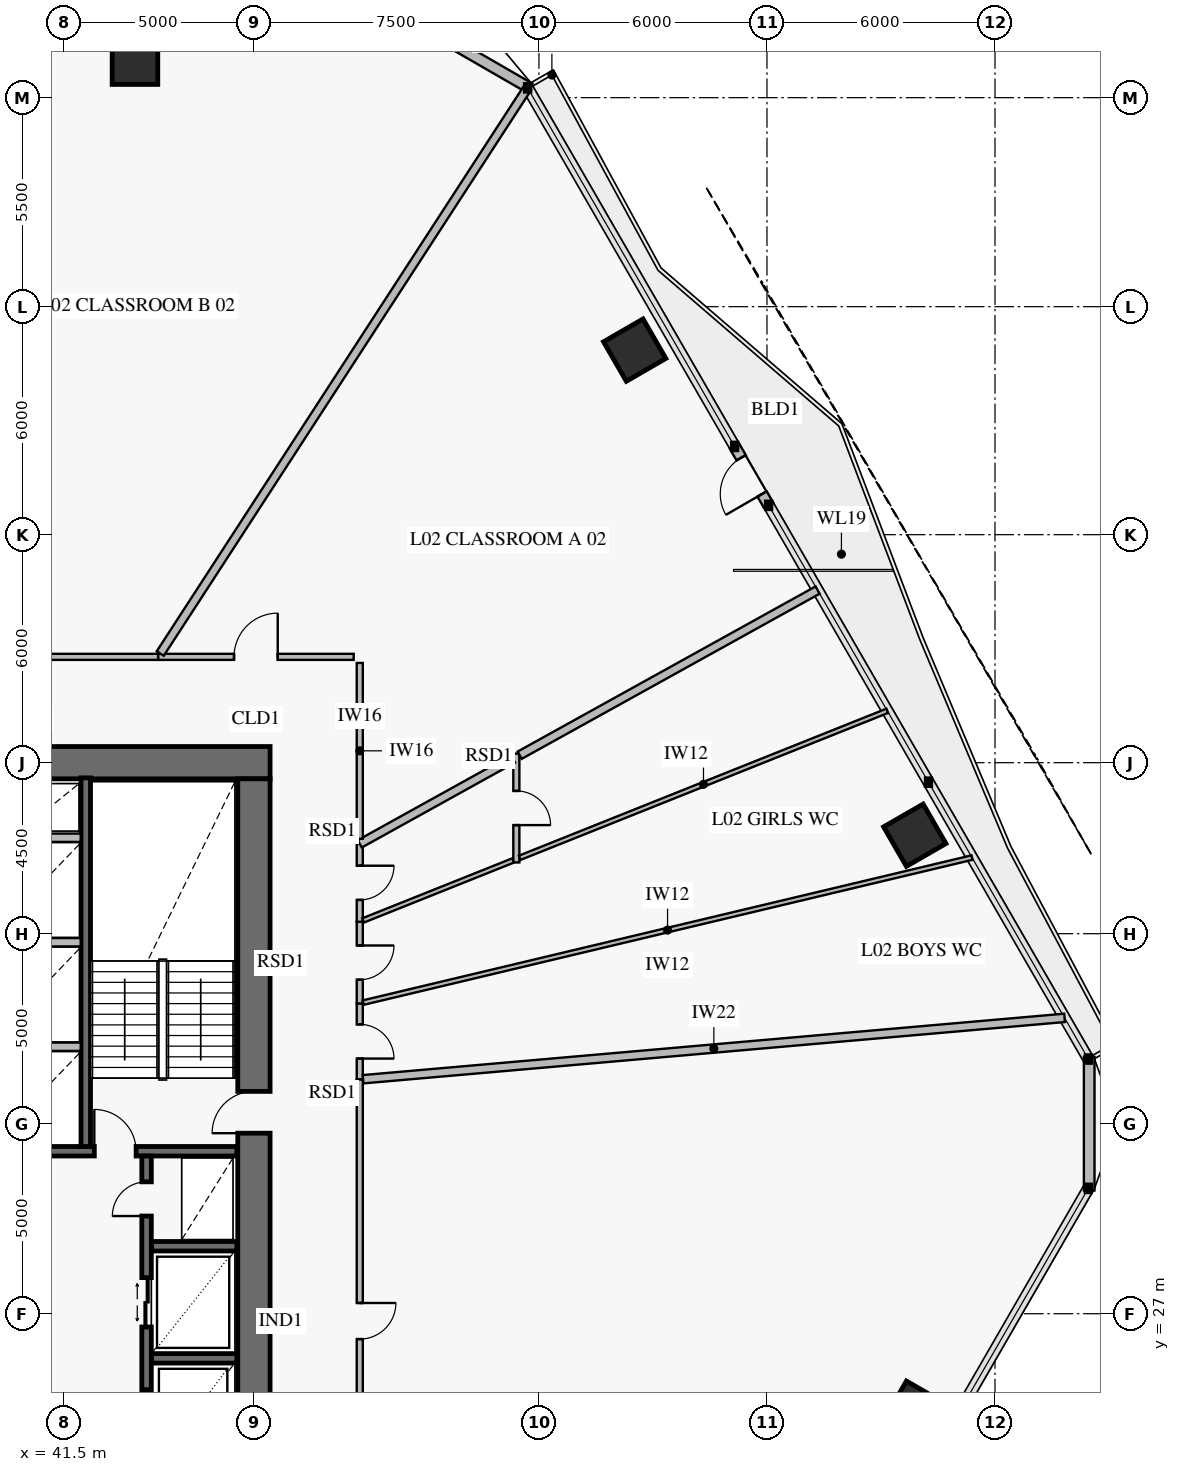
"""IFC4 building model, lengths in metres.
Left out: names, types, materials, properties, quantities, classifications, styles, units other than length and angle.
Written with IfcOpenShell. Run it as: python <this file> out.ifc"""

import sys

from ifc_helpers import new_model, si_unit, direction, frame, frame_2d, origin, origin_2d, place, context, subcontext, project, spatial, rectangle, extrude, element, fill, save


model = new_model("IFC4")
c1 = context("Model", 3, precision=1e-05, world=origin(), true_north=direction((0.0, 1.0)))
c2 = subcontext(c1, "Body", "Model", "MODEL_VIEW")
j1 = project(units=[si_unit("LENGTHUNIT", "METRE"), si_unit("PLANEANGLEUNIT", "RADIAN")], contexts=[c1])
p1 = place(None, origin())
s1 = spatial("IfcSite", under=j1, at=p1, CompositionType="ELEMENT")
p2 = place(p1, origin())
s2 = spatial("IfcBuilding", under=s1, at=p2, CompositionType="ELEMENT")
p3 = place(p2, frame((0.0, 0.0, 7.8)))
s3 = spatial("IfcBuildingStorey", under=s2, at=p3, CompositionType="ELEMENT", Elevation=7.8)
p4 = place(p3, frame((46.925, 41.5, 0.0), z_axis=(0.0, 0.0, 1.0), x_axis=(-1.0, 0.0, 0.0)))
e1 = element("IfcWall", 1, at=p4, inside=s3, PredefinedType="SHEAR", context=c2, shape_type="SweptSolid", body=[
    extrude(rectangle(XDim=7.975, YDim=0.85, at=frame_2d((3.988, 0.0))), origin(), (0.0, 0.0, 1.0), 4.2),
])
p5 = place(p3, frame((46.5, 22.925, 0.0), z_axis=(0.0, 0.0, 1.0), x_axis=(0.0, 1.0, 0.0)))
e2 = element("IfcWall", 2, at=p5, inside=s3, PredefinedType="SHEAR", context=c2, shape_type="SweptSolid", body=[
    extrude(rectangle(XDim=18.15, YDim=0.85, at=frame_2d((9.075, 0.0))), origin(), (0.0, 0.0, 1.0), 4.2),
])
p6 = place(p5, frame((8.825, 0.0, 0.0)))
e3 = element("IfcOpeningElement", 3, at=p6, cuts=e2, PredefinedType="OPENING", context=c2, shape_type="SweptSolid", body=[
    extrude(rectangle(XDim=1.1, YDim=2.15, at=frame_2d((0.55, 1.075))), frame((0.0, 0.437, 0.0), z_axis=(0.0, -1.0, 0.0), x_axis=(1.0, 0.0, 0.0)), (0.0, 0.0, 1.0), 0.874),
])
for number, where, z_axis, x_axis in (
    (4, (63.889, 39.592, 0.0), (0.0, 0.0, 1.0), (-0.5, 0.866, 0.0)),
    (5, (56.519, 52.357, 0.0), (0.0, 0.0, 1.0), (-0.5, 0.866, 0.0)),
    (6, (43.37, 59.948, 0.0), (0.0, 0.0, 1.0), (-1.0, 0.0, 0.0)),
    (7, (63.889, 24.408, 0.0), (0.0, 0.0, 1.0), (0.5, 0.866, 0.0)),
):
    element("IfcColumn", number, at=place(p3, frame(where, z_axis=z_axis, x_axis=x_axis)), inside=s3, PredefinedType="COLUMN", context=c2, shape_type="SweptSolid", body=[
        extrude(rectangle(XDim=1.2, YDim=1.2, at=origin_2d()), origin(), (0.0, 0.0, 1.0), 3.92),
    ])
p7 = place(p3, frame((50.717, 61.006, 0.0), z_axis=(0.0, 0.0, 1.0), x_axis=(0.866007452331, -0.500031091541, 0.0)))
e8 = element("IfcWall", 8, at=p7, inside=s3, PredefinedType="SOLIDWALL", context=c2, shape_type="SweptSolid", body=[
    extrude(rectangle(XDim=3.515, YDim=0.28, at=frame_2d((1.757, 0.0))), origin(), (0.0, 0.0, 1.0), 3.92),
])
p8 = place(p3, frame((59.148, 49.823, 0.0), z_axis=(0.0, 0.0, 1.0), x_axis=(0.499982180423, -0.866035691677, 0.0)))
e9 = element("IfcWall", 9, at=p8, inside=s3, PredefinedType="SOLIDWALL", context=c2, shape_type="SweptSolid", body=[
    extrude(rectangle(XDim=1.79, YDim=0.28, at=frame_2d((0.895, 0.0))), origin(), (0.0, 0.0, 1.0), 3.92),
])
p9 = place(p8, frame((0.345, 0.0, 0.0)))
e10 = element("IfcOpeningElement", 10, at=p9, cuts=e9, PredefinedType="OPENING", context=c2, shape_type="SweptSolid", body=[
    extrude(rectangle(XDim=1.1, YDim=2.2, at=frame_2d((0.55, 1.1))), frame((0.0, 0.152, 0.0), z_axis=(0.0, -1.0, 0.0), x_axis=(1.0, 0.0, 0.0)), (0.0, 0.0, 1.0), 0.304),
])
p10 = place(p3, frame((68.479, 33.758, 0.0), z_axis=(0.0, 0.0, 1.0), x_axis=(0.0, -1.0, 0.0)))
e11 = element("IfcWall", 11, at=p10, inside=s3, PredefinedType="SOLIDWALL", context=c2, shape_type="SweptSolid", body=[
    extrude(rectangle(XDim=3.515, YDim=0.28, at=frame_2d((1.758, 0.0))), origin(), (0.0, 0.0, 1.0), 3.92),
])
p11 = place(p3, frame((25.95, 31.275, 0.0), z_axis=(0.0, 0.0, 1.0), x_axis=(1.0, 0.0, 0.0)))
e12 = element("IfcWall", 12, at=p11, inside=s3, PredefinedType="SOLIDWALL", context=c2, shape_type="SweptSolid", body=[
    extrude(rectangle(XDim=20.1, YDim=0.25, at=frame_2d((10.05, 0.0))), origin(), (0.0, 0.0, 1.0), 4.2),
])
p12 = place(p11, frame((2.6, 0.0, 0.0)))
e13 = element("IfcOpeningElement", 13, at=p12, cuts=e12, PredefinedType="OPENING", context=c2, shape_type="SweptSolid", body=[
    extrude(rectangle(XDim=1.1, YDim=2.15, at=frame_2d((0.55, 1.075))), frame((0.0, 0.137, 0.0), z_axis=(0.0, -1.0, 0.0), x_axis=(1.0, 0.0, 0.0)), (0.0, 0.0, 1.0), 0.274),
])
p13 = place(p11, frame((10.6, 0.0, 0.0)))
e14 = element("IfcOpeningElement", 14, at=p13, cuts=e12, PredefinedType="OPENING", context=c2, shape_type="SweptSolid", body=[
    extrude(rectangle(XDim=1.1, YDim=2.15, at=frame_2d((0.55, 1.075))), frame((0.0, 0.137, 0.0), z_axis=(0.0, -1.0, 0.0), x_axis=(1.0, 0.0, 0.0)), (0.0, 0.0, 1.0), 0.274),
])
p14 = place(p11, frame((16.35, 0.0, 0.0)))
e15 = element("IfcOpeningElement", 15, at=p14, cuts=e12, PredefinedType="OPENING", context=c2, shape_type="SweptSolid", body=[
    extrude(rectangle(XDim=1.1, YDim=2.15, at=frame_2d((0.55, 1.075))), frame((0.0, 0.137, 0.0), z_axis=(0.0, -1.0, 0.0), x_axis=(1.0, 0.0, 0.0)), (0.0, 0.0, 1.0), 0.274),
])
p15 = place(p3, frame((42.075, 31.4, 0.0), z_axis=(0.0, 0.0, 1.0), x_axis=(0.0, 1.0, 0.0)))
e16 = element("IfcWall", 16, at=p15, inside=s3, PredefinedType="SOLIDWALL", context=c2, shape_type="SweptSolid", body=[
    extrude(rectangle(XDim=9.7, YDim=0.25, at=frame_2d((4.85, 0.0))), origin(), (0.0, 0.0, 1.0), 4.2),
])
for number, where, z_axis, x_axis in (
    (17, (43.8, 25.825, 0.0), (0.0, 0.0, 1.0), (1.0, 0.0, 0.0)),
    (18, (43.8, 28.775, 0.0), (0.0, 0.0, 1.0), (1.0, 0.0, 0.0)),
):
    element("IfcWall", number, at=place(p3, frame(where, z_axis=z_axis, x_axis=x_axis)), inside=s3, PredefinedType="SOLIDWALL", context=c2, shape_type="SweptSolid", body=[
        extrude(rectangle(XDim=2.25, YDim=0.25, at=frame_2d((1.125, 0.0))), origin(), (0.0, 0.0, 1.0), 4.2),
    ])
p16 = place(p3, frame((43.675, 22.95, 0.0), z_axis=(0.0, 0.0, 1.0), x_axis=(0.0, 1.0, 0.0)))
e19 = element("IfcWall", 19, at=p16, inside=s3, PredefinedType="SOLIDWALL", context=c2, shape_type="SweptSolid", body=[
    extrude(rectangle(XDim=8.2, YDim=0.25, at=frame_2d((4.1, 0.0))), origin(), (0.0, 0.0, 1.0), 4.2),
])
p17 = place(p16, frame((0.75, 0.0, 0.0)))
e20 = element("IfcOpeningElement", 20, at=p17, cuts=e19, PredefinedType="OPENING", context=c2, shape_type="SweptSolid", body=[
    extrude(rectangle(XDim=1.3, YDim=2.3, at=frame_2d((0.65, 1.15))), frame((0.0, 0.137, 0.0), z_axis=(0.0, -1.0, 0.0), x_axis=(1.0, 0.0, 0.0)), (0.0, 0.0, 1.0), 0.274),
])
p18 = place(p16, frame((3.7, 0.0, 0.0)))
e21 = element("IfcOpeningElement", 21, at=p18, cuts=e19, PredefinedType="OPENING", context=c2, shape_type="SweptSolid", body=[
    extrude(rectangle(XDim=1.3, YDim=2.3, at=frame_2d((0.65, 1.15))), frame((0.0, 0.137, 0.0), z_axis=(0.0, -1.0, 0.0), x_axis=(1.0, 0.0, 0.0)), (0.0, 0.0, 1.0), 0.274),
])
p19 = place(p16, frame((6.62, 0.0, 0.0)))
e22 = element("IfcOpeningElement", 22, at=p19, cuts=e19, PredefinedType="OPENING", context=c2, shape_type="SweptSolid", body=[
    extrude(rectangle(XDim=0.9, YDim=2.1, at=frame_2d((0.45, 1.05))), frame((0.0, 0.137, 0.0), z_axis=(0.0, -1.0, 0.0), x_axis=(1.0, 0.0, 0.0)), (0.0, 0.0, 1.0), 0.274),
])
p20 = place(p3, frame((49.285, 33.162, 0.0), z_axis=(0.0, 0.0, 1.0), x_axis=(0.0, 1.0, 0.0)))
e23 = element("IfcWall", 23, at=p20, inside=s3, PredefinedType="PARTITIONING", context=c2, shape_type="SweptSolid", body=[
    extrude(rectangle(XDim=2.002, YDim=0.16, at=frame_2d((1.001, 0.0))), origin(), (0.0, 0.0, 1.0), 3.92),
])
p21 = place(p20, frame((0.551, 0.0, 0.0)))
e24 = element("IfcOpeningElement", 24, at=p21, cuts=e23, PredefinedType="OPENING", context=c2, shape_type="SweptSolid", body=[
    extrude(rectangle(XDim=0.9, YDim=2.1, at=frame_2d((0.45, 1.05))), frame((0.0, 0.092, 0.0), z_axis=(0.0, -1.0, 0.0), x_axis=(1.0, 0.0, 0.0)), (0.0, 0.0, 1.0), 0.184),
])
p22 = place(p3, frame((49.285, 35.165, 0.0), z_axis=(0.0, 0.0, 1.0), x_axis=(0.0, 1.0, 0.0)))
e25 = element("IfcWall", 25, at=p22, inside=s3, PredefinedType="PARTITIONING", context=c2, shape_type="SweptSolid", body=[
    extrude(rectangle(XDim=2.149, YDim=0.16, at=frame_2d((1.074, 0.0))), origin(), (0.0, 0.0, 1.0), 3.22),
])
p23 = place(p22, frame((0.624, 0.0, 0.0)))
e26 = element("IfcOpeningElement", 26, at=p23, cuts=e25, PredefinedType="OPENING", context=c2, shape_type="SweptSolid", body=[
    extrude(rectangle(XDim=0.9, YDim=2.1, at=frame_2d((0.45, 1.05))), frame((0.0, 0.092, 0.0), z_axis=(0.0, -1.0, 0.0), x_axis=(1.0, 0.0, 0.0)), (0.0, 0.0, 1.0), 0.184),
])
p24 = place(p3, frame((53.405, 41.739, 0.0), z_axis=(0.0, 0.0, 1.0), x_axis=(0.0, -1.0, 0.0)))
e27 = element("IfcWall", 27, at=p24, inside=s3, PredefinedType="PARTITIONING", context=c2, shape_type="SweptSolid", body=[
    extrude(rectangle(XDim=2.864, YDim=0.16, at=frame_2d((1.432, 0.0))), origin(), (0.0, 0.0, 1.0), 3.92),
])
p25 = place(p24, frame((0.982, 0.0, 0.0)))
e28 = element("IfcOpeningElement", 28, at=p25, cuts=e27, PredefinedType="OPENING", context=c2, shape_type="SweptSolid", body=[
    extrude(rectangle(XDim=0.9, YDim=2.1, at=frame_2d((0.45, 1.05))), frame((0.0, 0.092, 0.0), z_axis=(0.0, -1.0, 0.0), x_axis=(1.0, 0.0, 0.0)), (0.0, 0.0, 1.0), 0.184),
])
p26 = place(p3, frame((49.285, 37.314, 0.0), z_axis=(0.0, 0.0, 1.0), x_axis=(0.0, 1.0, 0.0)))
e29 = element("IfcWall", 29, at=p26, inside=s3, PredefinedType="PARTITIONING", context=c2, shape_type="SweptSolid", body=[
    extrude(rectangle(XDim=2.05, YDim=0.16, at=frame_2d((1.025, 0.0))), origin(), (0.0, 0.0, 1.0), 3.92),
])
p27 = place(p26, frame((0.575, 0.0, 0.0)))
e30 = element("IfcOpeningElement", 30, at=p27, cuts=e29, PredefinedType="OPENING", context=c2, shape_type="SweptSolid", body=[
    extrude(rectangle(XDim=0.9, YDim=2.1, at=frame_2d((0.45, 1.05))), frame((0.0, 0.092, 0.0), z_axis=(0.0, -1.0, 0.0), x_axis=(1.0, 0.0, 0.0)), (0.0, 0.0, 1.0), 0.184),
])
p28 = place(p3, frame((49.125, 44.285, 0.0), z_axis=(0.0, 0.0, 1.0), x_axis=(-1.0, 0.0, 0.0)))
e31 = element("IfcWall", 31, at=p28, inside=s3, PredefinedType="PARTITIONING", context=c2, shape_type="SweptSolid", body=[
    extrude(rectangle(XDim=5.147, YDim=0.16, at=frame_2d((2.573, 0.0))), origin(), (0.0, 0.0, 1.0), 3.22),
])
p29 = place(p28, frame((1.999, 0.0, 0.0)))
e32 = element("IfcOpeningElement", 32, at=p29, cuts=e31, PredefinedType="OPENING", context=c2, shape_type="SweptSolid", body=[
    extrude(rectangle(XDim=1.15, YDim=2.2, at=frame_2d((0.575, 1.1))), frame((0.0, 0.092, 0.0), z_axis=(0.0, -1.0, 0.0), x_axis=(1.0, 0.0, 0.0)), (0.0, 0.0, 1.0), 0.184),
])
p30 = place(p3, frame((43.978, 44.285, 0.0), z_axis=(0.0, 0.0, 1.0), x_axis=(-1.0, 0.0, 0.0)))
e33 = element("IfcWall", 33, at=p30, inside=s3, PredefinedType="PARTITIONING", context=c2, shape_type="SweptSolid", body=[
    extrude(rectangle(XDim=6.903, YDim=0.16, at=frame_2d((3.452, 0.0))), origin(), (0.0, 0.0, 1.0), 3.22),
])
p31 = place(p30, frame((2.877, 0.0, 0.0)))
e34 = element("IfcOpeningElement", 34, at=p31, cuts=e33, PredefinedType="OPENING", context=c2, shape_type="SweptSolid", body=[
    extrude(rectangle(XDim=1.15, YDim=2.2, at=frame_2d((0.575, 1.1))), frame((0.0, 0.092, 0.0), z_axis=(0.0, -1.0, 0.0), x_axis=(1.0, 0.0, 0.0)), (0.0, 0.0, 1.0), 0.184),
])
p32 = place(p3, frame((49.285, 20.451, 0.0), z_axis=(0.0, 0.0, 1.0), x_axis=(0.0, 1.0, 0.0)))
e35 = element("IfcWall", 35, at=p32, inside=s3, PredefinedType="PARTITIONING", context=c2, shape_type="SweptSolid", body=[
    extrude(rectangle(XDim=12.711, YDim=0.16, at=frame_2d((6.355, 0.0))), origin(), (0.0, 0.0, 1.0), 3.22),
])
p33 = place(p32, frame((5.88, 0.0, 0.0)))
e36 = element("IfcOpeningElement", 36, at=p33, cuts=e35, PredefinedType="OPENING", context=c2, shape_type="SweptSolid", body=[
    extrude(rectangle(XDim=0.95, YDim=2.1, at=frame_2d((0.475, 1.05))), frame((0.0, 0.092, 0.0), z_axis=(0.0, -1.0, 0.0), x_axis=(1.0, 0.0, 0.0)), (0.0, 0.0, 1.0), 0.184),
])
for number, where, z_axis, x_axis in (
    (37, (39.558, 34.025, 0.0), (0.0, 0.0, 1.0), (1.0, 0.0, 0.0)),
    (38, (39.558, 36.775, 0.0), (0.0, 0.0, 1.0), (1.0, 0.0, 0.0)),
    (39, (39.558, 39.525, 0.0), (0.0, 0.0, 1.0), (1.0, 0.0, 0.0)),
):
    element("IfcWall", number, at=place(p3, frame(where, z_axis=z_axis, x_axis=x_axis)), inside=s3, PredefinedType="PARTITIONING", context=c2, shape_type="SweptSolid", body=[
        extrude(rectangle(XDim=2.384, YDim=0.22, at=frame_2d((1.192, 0.0))), origin(), (0.0, 0.0, 1.0), 3.92),
    ])
p34 = place(p3, frame((49.373, 33.17, 0.0), z_axis=(0.0, 0.0, 1.0), x_axis=(0.99619391773, 0.087164661858, 0.0)))
e40 = element("IfcWall", 40, at=p34, inside=s3, PredefinedType="PARTITIONING", context=c2, shape_type="SweptSolid", body=[
    extrude(rectangle(XDim=18.528, YDim=0.22, at=frame_2d((9.264, 0.0))), origin(), (0.0, 0.0, 1.0), 3.17),
])
p35 = place(p3, frame((49.373, 35.186, 0.0), z_axis=(0.0, 0.0, 1.0), x_axis=(0.972774396977, 0.231754120968, 0.0)))
e41 = element("IfcWall", 41, at=p35, inside=s3, PredefinedType="PARTITIONING", context=c2, shape_type="SweptSolid", body=[
    extrude(rectangle(XDim=16.471, YDim=0.12, at=frame_2d((8.235, 0.0))), origin(), (0.0, 0.0, 1.0), 3.17),
])
p36 = place(p3, frame((49.373, 37.349, 0.0), z_axis=(0.0, 0.0, 1.0), x_axis=(0.928488582268, 0.371360946517, 0.0)))
e42 = element("IfcWall", 42, at=p36, inside=s3, PredefinedType="PARTITIONING", context=c2, shape_type="SweptSolid", body=[
    extrude(rectangle(XDim=4.248, YDim=0.12, at=frame_2d((2.124, 0.0))), origin(), (0.0, 0.0, 1.0), 3.92),
])
p37 = place(p3, frame((53.493, 38.997, 0.0), z_axis=(0.0, 0.0, 1.0), x_axis=(0.928486388213, 0.371366432117, 0.0)))
e43 = element("IfcWall", 43, at=p37, inside=s3, PredefinedType="PARTITIONING", context=c2, shape_type="SweptSolid", body=[
    extrude(rectangle(XDim=10.417, YDim=0.12, at=frame_2d((5.208, 0.0))), origin(), (0.0, 0.0, 1.0), 3.17),
])
p38 = place(p3, frame((49.285, 39.364, 0.0), z_axis=(0.0, 0.0, 1.0), x_axis=(0.874606547494, 0.484833360115, 0.0)))
e44 = element("IfcWall", 44, at=p38, inside=s3, PredefinedType="PARTITIONING", context=c2, shape_type="SweptSolid", body=[
    extrude(rectangle(XDim=4.61, YDim=0.22, at=frame_2d((2.305, 0.0))), origin(), (0.0, 0.0, 1.0), 3.92),
])
p39 = place(p3, frame((53.493, 41.697, 0.0), z_axis=(0.0, 0.0, 1.0), x_axis=(0.874622025543, 0.484805437711, 0.0)))
e45 = element("IfcWall", 45, at=p39, inside=s3, PredefinedType="PARTITIONING", context=c2, shape_type="SweptSolid", body=[
    extrude(rectangle(XDim=8.962, YDim=0.22, at=frame_2d((4.481, 0.0))), origin(), (0.0, 0.0, 1.0), 3.17),
])
p40 = place(p3, frame((44.035, 44.373, 0.0), z_axis=(0.0, 0.0, 1.0), x_axis=(0.544634848015, 0.838673287, 0.0)))
e46 = element("IfcWall", 46, at=p40, inside=s3, PredefinedType="PARTITIONING", context=c2, shape_type="SweptSolid", body=[
    extrude(rectangle(XDim=17.748, YDim=0.22, at=frame_2d((8.874, 0.0))), origin(), (0.0, 0.0, 1.0), 3.17),
])
p41 = place(p3, frame((49.285, 39.499, 0.0), z_axis=(0.0, 0.0, 1.0), x_axis=(0.0, 1.0, 0.0)))
e47 = element("IfcWall", 47, at=p41, inside=s3, PredefinedType="PARTITIONING", context=c2, shape_type="SweptSolid", body=[
    extrude(rectangle(XDim=4.626, YDim=0.16, at=frame_2d((2.313, 0.0))), origin(), (0.0, 0.0, 1.0), 3.92),
])
p42 = place(p9, frame((1.1, 0.0, 0.0), z_axis=(0.0, 0.0, 1.0), x_axis=(-1.0, 0.0, 0.0)))
e48 = element("IfcDoor", 48, at=p42, inside=s3, OperationType="SINGLE_SWING_LEFT", PredefinedType="DOOR", context=c2, shape_type="SweptSolid", body=[
    extrude(rectangle(XDim=1.1, YDim=2.2, at=frame_2d((0.55, 1.1))), frame((0.0, 0.025, 0.0), z_axis=(0.0, -1.0, 0.0), x_axis=(1.0, 0.0, 0.0)), (0.0, 0.0, 1.0), 0.05),
])
fill(e10, e48)
p43 = place(p6, origin())
e49 = element("IfcDoor", 49, at=p43, inside=s3, OperationType="SINGLE_SWING_LEFT", PredefinedType="USERDEFINED", context=c2, shape_type="SweptSolid", body=[
    extrude(rectangle(XDim=1.1, YDim=2.15, at=frame_2d((0.55, 1.075))), frame((0.0, 0.025, 0.0), z_axis=(0.0, -1.0, 0.0), x_axis=(1.0, 0.0, 0.0)), (0.0, 0.0, 1.0), 0.05),
])
fill(e3, e49)
p44 = place(p14, origin())
e50 = element("IfcDoor", 50, at=p44, inside=s3, OperationType="SINGLE_SWING_LEFT", PredefinedType="USERDEFINED", context=c2, shape_type="SweptSolid", body=[
    extrude(rectangle(XDim=1.1, YDim=2.15, at=frame_2d((0.55, 1.075))), frame((0.0, 0.025, 0.0), z_axis=(0.0, -1.0, 0.0), x_axis=(1.0, 0.0, 0.0)), (0.0, 0.0, 1.0), 0.05),
])
fill(e15, e50)
p45 = place(p17, origin())
e51 = element("IfcDoor", 51, at=p45, inside=s3, OperationType="DOUBLE_DOOR_SLIDING", PredefinedType="DOOR", context=c2, shape_type="SweptSolid", body=[
    extrude(rectangle(XDim=1.3, YDim=2.3, at=frame_2d((0.65, 1.15))), frame((0.0, 0.025, 0.0), z_axis=(0.0, -1.0, 0.0), x_axis=(1.0, 0.0, 0.0)), (0.0, 0.0, 1.0), 0.05),
])
fill(e20, e51)
p46 = place(p18, origin())
e52 = element("IfcDoor", 52, at=p46, inside=s3, OperationType="DOUBLE_DOOR_SLIDING", PredefinedType="DOOR", context=c2, shape_type="SweptSolid", body=[
    extrude(rectangle(XDim=1.3, YDim=2.3, at=frame_2d((0.65, 1.15))), frame((0.0, 0.025, 0.0), z_axis=(0.0, -1.0, 0.0), x_axis=(1.0, 0.0, 0.0)), (0.0, 0.0, 1.0), 0.05),
])
fill(e21, e52)
p47 = place(p19, origin())
e53 = element("IfcDoor", 53, at=p47, inside=s3, OperationType="SINGLE_SWING_LEFT", PredefinedType="DOOR", context=c2, shape_type="SweptSolid", body=[
    extrude(rectangle(XDim=0.9, YDim=2.1, at=frame_2d((0.45, 1.05))), frame((0.0, 0.025, 0.0), z_axis=(0.0, -1.0, 0.0), x_axis=(1.0, 0.0, 0.0)), (0.0, 0.0, 1.0), 0.05),
])
fill(e22, e53)
p48 = place(p21, frame((0.9, 0.0, 0.0), z_axis=(0.0, 0.0, 1.0), x_axis=(-1.0, 0.0, 0.0)))
e54 = element("IfcDoor", 54, at=p48, inside=s3, OperationType="SINGLE_SWING_RIGHT", PredefinedType="DOOR", context=c2, shape_type="SweptSolid", body=[
    extrude(rectangle(XDim=0.9, YDim=2.1, at=frame_2d((0.45, 1.05))), frame((0.0, 0.025, 0.0), z_axis=(0.0, -1.0, 0.0), x_axis=(1.0, 0.0, 0.0)), (0.0, 0.0, 1.0), 0.05),
])
fill(e24, e54)
p49 = place(p23, frame((0.9, 0.0, 0.0), z_axis=(0.0, 0.0, 1.0), x_axis=(-1.0, 0.0, 0.0)))
e55 = element("IfcDoor", 55, at=p49, inside=s3, OperationType="SINGLE_SWING_LEFT", PredefinedType="DOOR", context=c2, shape_type="SweptSolid", body=[
    extrude(rectangle(XDim=0.9, YDim=2.1, at=frame_2d((0.45, 1.05))), frame((0.0, 0.025, 0.0), z_axis=(0.0, -1.0, 0.0), x_axis=(1.0, 0.0, 0.0)), (0.0, 0.0, 1.0), 0.05),
])
fill(e26, e55)
p50 = place(p25, origin())
e56 = element("IfcDoor", 56, at=p50, inside=s3, OperationType="SINGLE_SWING_RIGHT", PredefinedType="DOOR", context=c2, shape_type="SweptSolid", body=[
    extrude(rectangle(XDim=0.9, YDim=2.1, at=frame_2d((0.45, 1.05))), frame((0.0, 0.025, 0.0), z_axis=(0.0, -1.0, 0.0), x_axis=(1.0, 0.0, 0.0)), (0.0, 0.0, 1.0), 0.05),
])
fill(e28, e56)
p51 = place(p27, frame((0.9, 0.0, 0.0), z_axis=(0.0, 0.0, 1.0), x_axis=(-1.0, 0.0, 0.0)))
e57 = element("IfcDoor", 57, at=p51, inside=s3, OperationType="SINGLE_SWING_LEFT", PredefinedType="DOOR", context=c2, shape_type="SweptSolid", body=[
    extrude(rectangle(XDim=0.9, YDim=2.1, at=frame_2d((0.45, 1.05))), frame((0.0, 0.025, 0.0), z_axis=(0.0, -1.0, 0.0), x_axis=(1.0, 0.0, 0.0)), (0.0, 0.0, 1.0), 0.05),
])
fill(e30, e57)
p52 = place(p29, frame((1.15, 0.0, 0.0), z_axis=(0.0, 0.0, 1.0), x_axis=(-1.0, 0.0, 0.0)))
e58 = element("IfcDoor", 58, at=p52, inside=s3, OperationType="SINGLE_SWING_RIGHT", PredefinedType="DOOR", context=c2, shape_type="SweptSolid", body=[
    extrude(rectangle(XDim=1.15, YDim=2.2, at=frame_2d((0.575, 1.1))), frame((0.0, 0.025, 0.0), z_axis=(0.0, -1.0, 0.0), x_axis=(1.0, 0.0, 0.0)), (0.0, 0.0, 1.0), 0.05),
])
fill(e32, e58)
p53 = place(p33, frame((0.95, 0.0, 0.0), z_axis=(0.0, 0.0, 1.0), x_axis=(-1.0, 0.0, 0.0)))
e59 = element("IfcDoor", 59, at=p53, inside=s3, OperationType="SINGLE_SWING_LEFT", PredefinedType="DOOR", context=c2, shape_type="SweptSolid", body=[
    extrude(rectangle(XDim=0.95, YDim=2.1, at=frame_2d((0.475, 1.05))), frame((0.0, 0.025, 0.0), z_axis=(0.0, -1.0, 0.0), x_axis=(1.0, 0.0, 0.0)), (0.0, 0.0, 1.0), 0.05),
])
fill(e36, e59)
save(model, sys.argv[1])
